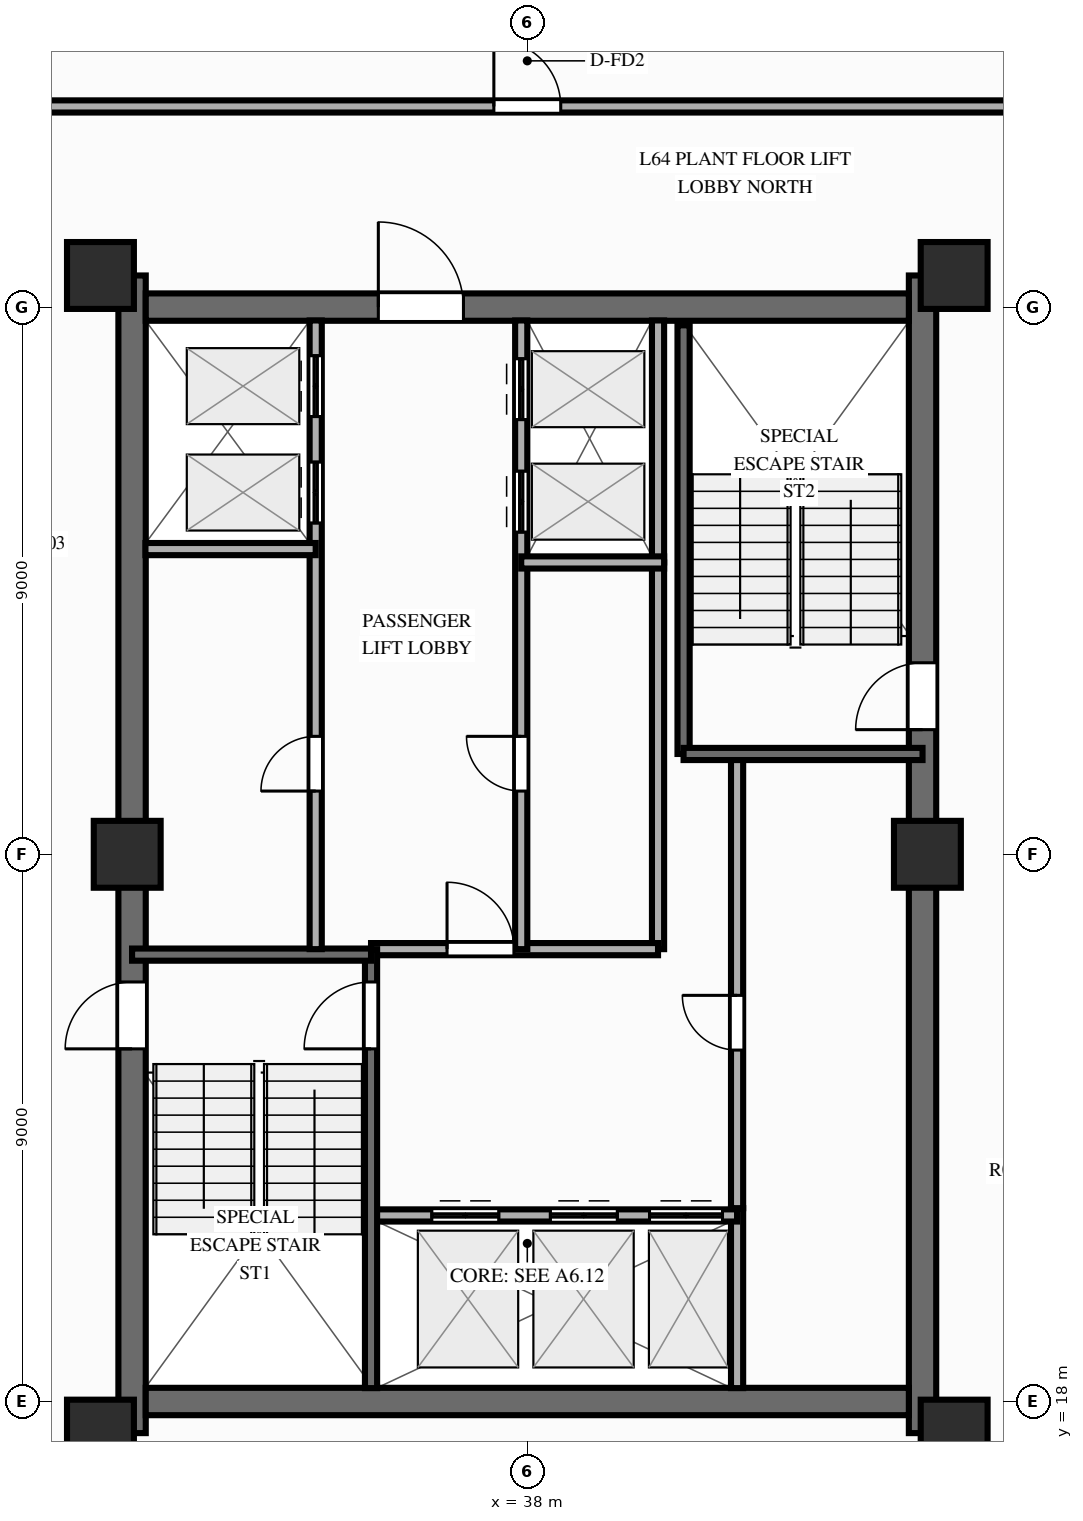
"""IFC4 building model, lengths in metres.
Left out: names, types, materials, properties, quantities, classifications, styles, units other than length and angle.
Written with IfcOpenShell. Run it as: python <this file> out.ifc"""

import sys

from ifc_helpers import new_model, si_unit, direction, frame, frame_2d, origin, origin_2d, place, context, subcontext, project, spatial, rectangle, extrude, source, transform, mapped, element, fill, save


model = new_model("IFC4")
c1 = context("Model", 3, precision=1e-05, world=origin(), true_north=direction((0.0, 1.0)))
c2 = subcontext(c1, "Body", "Model", "MODEL_VIEW")
j1 = project(units=[si_unit("LENGTHUNIT", "METRE"), si_unit("PLANEANGLEUNIT", "RADIAN")], contexts=[c1])
p1 = place(None, origin())
s1 = spatial("IfcSite", under=j1, at=p1, CompositionType="ELEMENT")
p2 = place(p1, origin())
s2 = spatial("IfcBuilding", under=s1, at=p2, CompositionType="ELEMENT")
p3 = place(p2, frame((0.0, 0.0, 206.5)))
s3 = spatial("IfcBuildingStorey", under=s2, at=p3, CompositionType="ELEMENT", Elevation=206.5)
p4 = place(p3, frame((31.5, 17.48, 0.0), z_axis=(0.0, 0.0, 1.0), x_axis=(0.0, 1.0, 0.0)))
e1 = element("IfcWall", 1, at=p4, inside=s3, PredefinedType="SHEAR", context=c2, shape_type="SweptSolid", body=[
    extrude(rectangle(XDim=19.04, YDim=0.45, at=frame_2d((9.52, 0.0))), origin(), (0.0, 0.0, 1.0), 3.8),
])
p5 = place(p4, frame((6.32, 0.0, 0.0)))
e2 = element("IfcOpeningElement", 2, at=p5, cuts=e1, PredefinedType="OPENING", context=c2, shape_type="SweptSolid", body=[
    extrude(rectangle(XDim=1.1, YDim=2.15, at=frame_2d((0.55, 1.075))), frame((0.0, 0.237, 0.0), z_axis=(0.0, -1.0, 0.0), x_axis=(1.0, 0.0, 0.0)), (0.0, 0.0, 1.0), 0.474),
])
p6 = place(p3, frame((44.5, 17.48, 0.0), z_axis=(0.0, 0.0, 1.0), x_axis=(0.0, 1.0, 0.0)))
e3 = element("IfcWall", 3, at=p6, inside=s3, PredefinedType="SHEAR", context=c2, shape_type="SweptSolid", body=[
    extrude(rectangle(XDim=19.04, YDim=0.45, at=frame_2d((9.52, 0.0))), origin(), (0.0, 0.0, 1.0), 3.8),
])
p7 = place(p6, frame((12.67, 0.0, 0.0), z_axis=(0.0, 0.0, 1.0), x_axis=(-1.0, 0.0, 0.0)))
e4 = element("IfcOpeningElement", 4, at=p7, cuts=e3, PredefinedType="OPENING", context=c2, shape_type="SweptSolid", body=[
    extrude(rectangle(XDim=1.1, YDim=2.15, at=frame_2d((0.55, 1.075))), frame((0.0, 0.237, 0.0), z_axis=(0.0, -1.0, 0.0), x_axis=(1.0, 0.0, 0.0)), (0.0, 0.0, 1.0), 0.474),
])
p8 = place(p3, frame((31.725, 18.0, 0.0), z_axis=(0.0, 0.0, 1.0), x_axis=(1.0, 0.0, 0.0)))
e5 = element("IfcWall", 5, at=p8, inside=s3, PredefinedType="SHEAR", context=c2, shape_type="SweptSolid", body=[
    extrude(rectangle(XDim=12.55, YDim=0.45, at=frame_2d((6.275, 0.0))), origin(), (0.0, 0.0, 1.0), 3.8),
])
p9 = place(p3, frame((31.725, 36.0, 0.0), z_axis=(0.0, 0.0, 1.0), x_axis=(1.0, 0.0, 0.0)))
e6 = element("IfcWall", 6, at=p9, inside=s3, PredefinedType="SHEAR", context=c2, shape_type="SweptSolid", body=[
    extrude(rectangle(XDim=12.55, YDim=0.45, at=frame_2d((6.275, 0.0))), origin(), (0.0, 0.0, 1.0), 3.8),
])
p10 = place(p9, frame((5.225, 0.0, 0.0), z_axis=(0.0, 0.0, 1.0), x_axis=(-1.0, 0.0, 0.0)))
e7 = element("IfcOpeningElement", 7, at=p10, cuts=e6, PredefinedType="OPENING", context=c2, shape_type="SweptSolid", body=[
    extrude(rectangle(XDim=1.4, YDim=2.15, at=frame_2d((0.7, 1.075))), frame((0.0, 0.237, 0.0), z_axis=(0.0, -1.0, 0.0), x_axis=(1.0, 0.0, 0.0)), (0.0, 0.0, 1.0), 0.474),
])
m1 = source(origin(), c2, "Body", "SweptSolid", [
    extrude(rectangle(XDim=1.1, YDim=1.1, at=origin_2d()), origin(), (0.0, 0.0, 1.0), 3.8),
])
for number, where, z_axis, x_axis in (
    (8, (30.98, 17.48, 0.0), (0.0, 0.0, 1.0), (1.0, 0.0, 0.0)),
    (9, (45.02, 17.48, 0.0), (0.0, 0.0, 1.0), (1.0, 0.0, 0.0)),
    (10, (30.98, 36.52, 0.0), (0.0, 0.0, 1.0), (1.0, 0.0, 0.0)),
    (11, (45.02, 36.52, 0.0), (0.0, 0.0, 1.0), (1.0, 0.0, 0.0)),
    (12, (31.42, 27.0, 0.0), (0.0, 0.0, 1.0), (1.0, 0.0, 0.0)),
    (13, (44.58, 27.0, 0.0), (0.0, 0.0, 1.0), (1.0, 0.0, 0.0)),
):
    element("IfcColumn", number, at=place(p3, frame(where, z_axis=z_axis, x_axis=x_axis)), inside=s3, PredefinedType="COLUMN", context=c2, shape_type="MappedRepresentation", body=[
        mapped(m1, transform((0.0, 0.0, 0.0), scale=1.0)),
    ])
p11 = place(p3, frame((41.45, 18.22, 0.0), z_axis=(0.0, 0.0, 1.0), x_axis=(0.0, 1.0, 0.0)))
e14 = element("IfcWall", 14, at=p11, inside=s3, PredefinedType="PARTITIONING", context=c2, shape_type="SweptSolid", body=[
    extrude(rectangle(XDim=2.96, YDim=0.2, at=frame_2d((1.48, 0.0))), origin(), (0.0, 0.0, 1.0), 3.59),
])
p12 = place(p3, frame((41.45, 21.18, 0.0), z_axis=(0.0, 0.0, 1.0), x_axis=(0.0, 1.0, 0.0)))
e15 = element("IfcWall", 15, at=p12, inside=s3, PredefinedType="PARTITIONING", context=c2, shape_type="SweptSolid", body=[
    extrude(rectangle(XDim=7.42, YDim=0.2, at=frame_2d((3.71, 0.0))), origin(), (0.0, 0.0, 1.0), 3.59),
])
p13 = place(p12, frame((2.6, 0.0, 0.0)))
e16 = element("IfcOpeningElement", 16, at=p13, cuts=e15, PredefinedType="OPENING", context=c2, shape_type="SweptSolid", body=[
    extrude(rectangle(XDim=0.9, YDim=2.1, at=frame_2d((0.45, 1.05))), frame((0.0, 0.112, 0.0), z_axis=(0.0, -1.0, 0.0), x_axis=(1.0, 0.0, 0.0)), (0.0, 0.0, 1.0), 0.224),
])
p14 = place(p3, frame((40.15, 25.44, 0.0), z_axis=(0.0, 0.0, 1.0), x_axis=(0.0, 1.0, 0.0)))
e17 = element("IfcWall", 17, at=p14, inside=s3, PredefinedType="PARTITIONING", context=c2, shape_type="SweptSolid", body=[
    extrude(rectangle(XDim=6.36, YDim=0.2, at=frame_2d((3.18, 0.0))), origin(), (0.0, 0.0, 1.0), 3.59),
])
p15 = place(p3, frame((40.15, 31.8, 0.0), z_axis=(0.0, 0.0, 1.0), x_axis=(0.0, 1.0, 0.0)))
e18 = element("IfcWall", 18, at=p15, inside=s3, PredefinedType="PARTITIONING", context=c2, shape_type="SweptSolid", body=[
    extrude(rectangle(XDim=3.98, YDim=0.2, at=frame_2d((1.99, 0.0))), origin(), (0.0, 0.0, 1.0), 3.59),
])
p16 = place(p3, frame((35.43, 21.06, 0.0), z_axis=(0.0, 0.0, 1.0), x_axis=(1.0, 0.0, 0.0)))
e19 = element("IfcWall", 19, at=p16, inside=s3, PredefinedType="PARTITIONING", context=c2, shape_type="SweptSolid", body=[
    extrude(rectangle(XDim=6.02, YDim=0.2, at=frame_2d((3.01, 0.0))), origin(), (0.0, 0.0, 1.0), 3.59),
])
p17 = place(p16, frame((1.0, 0.0, 0.0)))
e20 = element("IfcOpeningElement", 20, at=p17, cuts=e19, PredefinedType="OPENING", context=c2, shape_type="SweptSolid", body=[
    extrude(rectangle(XDim=1.1, YDim=2.15, at=frame_2d((0.55, 1.075))), frame((0.0, 0.112, 0.0), z_axis=(0.0, -1.0, 0.0), x_axis=(1.0, 0.0, 0.0)), (0.0, 0.0, 1.0), 0.224),
])
p18 = place(p16, frame((2.95, 0.0, 0.0)))
e21 = element("IfcOpeningElement", 21, at=p18, cuts=e19, PredefinedType="OPENING", context=c2, shape_type="SweptSolid", body=[
    extrude(rectangle(XDim=1.1, YDim=2.15, at=frame_2d((0.55, 1.075))), frame((0.0, 0.112, 0.0), z_axis=(0.0, -1.0, 0.0), x_axis=(1.0, 0.0, 0.0)), (0.0, 0.0, 1.0), 0.224),
])
p19 = place(p16, frame((4.58, 0.0, 0.0)))
e22 = element("IfcOpeningElement", 22, at=p19, cuts=e19, PredefinedType="OPENING", context=c2, shape_type="SweptSolid", body=[
    extrude(rectangle(XDim=1.2, YDim=2.15, at=frame_2d((0.6, 1.075))), frame((0.0, 0.112, 0.0), z_axis=(0.0, -1.0, 0.0), x_axis=(1.0, 0.0, 0.0)), (0.0, 0.0, 1.0), 0.224),
])
p20 = place(p3, frame((35.43, 25.44, 0.0), z_axis=(0.0, 0.0, 1.0), x_axis=(1.0, 0.0, 0.0)))
e23 = element("IfcWall", 23, at=p20, inside=s3, PredefinedType="PARTITIONING", context=c2, shape_type="SweptSolid", body=[
    extrude(rectangle(XDim=4.72, YDim=0.2, at=frame_2d((2.36, 0.0))), origin(), (0.0, 0.0, 1.0), 3.59),
])
p21 = place(p20, frame((1.25, 0.0, 0.0)))
e24 = element("IfcOpeningElement", 24, at=p21, cuts=e23, PredefinedType="OPENING", context=c2, shape_type="SweptSolid", body=[
    extrude(rectangle(XDim=1.1, YDim=2.15, at=frame_2d((0.55, 1.075))), frame((0.0, 0.112, 0.0), z_axis=(0.0, -1.0, 0.0), x_axis=(1.0, 0.0, 0.0)), (0.0, 0.0, 1.0), 0.224),
])
p22 = place(p3, frame((35.43, 18.22, 0.0), z_axis=(0.0, 0.0, 1.0), x_axis=(0.0, 1.0, 0.0)))
e25 = element("IfcWall", 25, at=p22, inside=s3, PredefinedType="SOLIDWALL", context=c2, shape_type="SweptSolid", body=[
    extrude(rectangle(XDim=7.22, YDim=0.2, at=frame_2d((3.61, 0.0))), origin(), (0.0, 0.0, 1.0), 3.59),
])
p23 = place(p22, frame((6.68, 0.0, 0.0), z_axis=(0.0, 0.0, 1.0), x_axis=(-1.0, 0.0, 0.0)))
e26 = element("IfcOpeningElement", 26, at=p23, cuts=e25, PredefinedType="OPENING", context=c2, shape_type="SweptSolid", body=[
    extrude(rectangle(XDim=1.1, YDim=2.15, at=frame_2d((0.55, 1.075))), frame((0.0, 0.112, 0.0), z_axis=(0.0, -1.0, 0.0), x_axis=(1.0, 0.0, 0.0)), (0.0, 0.0, 1.0), 0.224),
])
p24 = place(p3, frame((31.5, 25.35, 0.0), z_axis=(0.0, 0.0, 1.0), x_axis=(1.0, 0.0, 0.0)))
e27 = element("IfcWall", 27, at=p24, inside=s3, PredefinedType="SOLIDWALL", context=c2, shape_type="SweptSolid", body=[
    extrude(rectangle(XDim=3.93, YDim=0.2, at=frame_2d((1.965, 0.0))), origin(), (0.0, 0.0, 1.0), 3.59),
])
p25 = place(p3, frame((40.57, 28.65, 0.0), z_axis=(0.0, 0.0, 1.0), x_axis=(0.0, 1.0, 0.0)))
e28 = element("IfcWall", 28, at=p25, inside=s3, PredefinedType="SOLIDWALL", context=c2, shape_type="SweptSolid", body=[
    extrude(rectangle(XDim=7.05, YDim=0.2, at=frame_2d((3.525, 0.0))), origin(), (0.0, 0.0, 1.0), 3.59),
])
p26 = place(p3, frame((40.57, 28.65, 0.0), z_axis=(0.0, 0.0, 1.0), x_axis=(1.0, 0.0, 0.0)))
e29 = element("IfcWall", 29, at=p26, inside=s3, PredefinedType="SOLIDWALL", context=c2, shape_type="SweptSolid", body=[
    extrude(rectangle(XDim=3.93, YDim=0.2, at=frame_2d((1.965, 0.0))), origin(), (0.0, 0.0, 1.0), 3.59),
])
p27 = place(p3, frame((34.52, 25.44, 0.0), z_axis=(0.0, 0.0, 1.0), x_axis=(0.0, 1.0, 0.0)))
e30 = element("IfcWall", 30, at=p27, inside=s3, PredefinedType="PARTITIONING", context=c2, shape_type="SweptSolid", body=[
    extrude(rectangle(XDim=10.34, YDim=0.2, at=frame_2d((5.17, 0.0))), origin(), (0.0, 0.0, 1.0), 3.59),
])
p28 = place(p27, frame((2.6, 0.0, 0.0)))
e31 = element("IfcOpeningElement", 31, at=p28, cuts=e30, PredefinedType="OPENING", context=c2, shape_type="SweptSolid", body=[
    extrude(rectangle(XDim=0.9, YDim=2.1, at=frame_2d((0.45, 1.05))), frame((0.0, 0.112, 0.0), z_axis=(0.0, -1.0, 0.0), x_axis=(1.0, 0.0, 0.0)), (0.0, 0.0, 1.0), 0.224),
])
p29 = place(p27, frame((7.01, 0.0, 0.0)))
e32 = element("IfcOpeningElement", 32, at=p29, cuts=e30, PredefinedType="OPENING", context=c2, shape_type="SweptSolid", body=[
    extrude(rectangle(XDim=1.0, YDim=2.15, at=frame_2d((0.5, 1.075))), frame((0.0, 0.112, 0.0), z_axis=(0.0, -1.0, 0.0), x_axis=(1.0, 0.0, 0.0)), (0.0, 0.0, 1.0), 0.224),
])
p30 = place(p27, frame((8.76, 0.0, 0.0)))
e33 = element("IfcOpeningElement", 33, at=p30, cuts=e30, PredefinedType="OPENING", context=c2, shape_type="SweptSolid", body=[
    extrude(rectangle(XDim=1.0, YDim=2.15, at=frame_2d((0.5, 1.075))), frame((0.0, 0.112, 0.0), z_axis=(0.0, -1.0, 0.0), x_axis=(1.0, 0.0, 0.0)), (0.0, 0.0, 1.0), 0.224),
])
p31 = place(p3, frame((31.72, 32.02, 0.0), z_axis=(0.0, 0.0, 1.0), x_axis=(1.0, 0.0, 0.0)))
e34 = element("IfcWall", 34, at=p31, inside=s3, PredefinedType="PARTITIONING", context=c2, shape_type="SweptSolid", body=[
    extrude(rectangle(XDim=2.8, YDim=0.2, at=frame_2d((1.4, 0.0))), origin(), (0.0, 0.0, 1.0), 3.59),
])
p32 = place(p3, frame((37.9, 25.44, 0.0), z_axis=(0.0, 0.0, 1.0), x_axis=(0.0, 1.0, 0.0)))
e35 = element("IfcWall", 35, at=p32, inside=s3, PredefinedType="PARTITIONING", context=c2, shape_type="SweptSolid", body=[
    extrude(rectangle(XDim=10.34, YDim=0.2, at=frame_2d((5.17, 0.0))), origin(), (0.0, 0.0, 1.0), 3.59),
])
p33 = place(p32, frame((2.6, 0.0, 0.0)))
e36 = element("IfcOpeningElement", 36, at=p33, cuts=e35, PredefinedType="OPENING", context=c2, shape_type="SweptSolid", body=[
    extrude(rectangle(XDim=0.9, YDim=2.1, at=frame_2d((0.45, 1.05))), frame((0.0, 0.112, 0.0), z_axis=(0.0, -1.0, 0.0), x_axis=(1.0, 0.0, 0.0)), (0.0, 0.0, 1.0), 0.224),
])
p34 = place(p32, frame((6.86, 0.0, 0.0)))
e37 = element("IfcOpeningElement", 37, at=p34, cuts=e35, PredefinedType="OPENING", context=c2, shape_type="SweptSolid", body=[
    extrude(rectangle(XDim=1.0, YDim=2.15, at=frame_2d((0.5, 1.075))), frame((0.0, 0.112, 0.0), z_axis=(0.0, -1.0, 0.0), x_axis=(1.0, 0.0, 0.0)), (0.0, 0.0, 1.0), 0.224),
])
p35 = place(p32, frame((8.71, 0.0, 0.0)))
e38 = element("IfcOpeningElement", 38, at=p35, cuts=e35, PredefinedType="OPENING", context=c2, shape_type="SweptSolid", body=[
    extrude(rectangle(XDim=1.0, YDim=2.15, at=frame_2d((0.5, 1.075))), frame((0.0, 0.112, 0.0), z_axis=(0.0, -1.0, 0.0), x_axis=(1.0, 0.0, 0.0)), (0.0, 0.0, 1.0), 0.224),
])
p36 = place(p3, frame((37.9, 31.8, 0.0), z_axis=(0.0, 0.0, 1.0), x_axis=(1.0, 0.0, 0.0)))
e39 = element("IfcWall", 39, at=p36, inside=s3, PredefinedType="PARTITIONING", context=c2, shape_type="SweptSolid", body=[
    extrude(rectangle(XDim=2.35, YDim=0.2, at=frame_2d((1.175, 0.0))), origin(), (0.0, 0.0, 1.0), 3.59),
])
p37 = place(p3, frame((28.9, 39.3, 0.0), z_axis=(0.0, 0.0, 1.0), x_axis=(1.0, 0.0, 0.0)))
e40 = element("IfcWall", 40, at=p37, inside=s3, PredefinedType="PARTITIONING", context=c2, shape_type="SweptSolid", body=[
    extrude(rectangle(XDim=18.2, YDim=0.2, at=frame_2d((9.1, 0.0))), origin(), (0.0, 0.0, 1.0), 3.59),
])
p38 = place(p37, frame((8.55, 0.0, 0.0)))
e41 = element("IfcOpeningElement", 41, at=p38, cuts=e40, PredefinedType="OPENING", context=c2, shape_type="SweptSolid", body=[
    extrude(rectangle(XDim=1.1, YDim=2.15, at=frame_2d((0.55, 1.075))), frame((0.0, 0.112, 0.0), z_axis=(0.0, -1.0, 0.0), x_axis=(1.0, 0.0, 0.0)), (0.0, 0.0, 1.0), 0.224),
])
m2 = source(origin(), c2, "Body", "SweptSolid", [
    extrude(rectangle(XDim=1.1, YDim=2.15, at=frame_2d((0.55, 1.075))), frame((0.0, 0.025, 0.0), z_axis=(0.0, -1.0, 0.0), x_axis=(1.0, 0.0, 0.0)), (0.0, 0.0, 1.0), 0.05),
])
p39 = place(p5, origin())
e42 = element("IfcDoor", 42, at=p39, inside=s3, OperationType="SINGLE_SWING_LEFT", PredefinedType="DOOR", context=c2, shape_type="MappedRepresentation", body=[
    mapped(m2, transform((0.0, 0.0, 0.0), scale=1.0)),
])
fill(e2, e42)
p40 = place(p7, origin())
e43 = element("IfcDoor", 43, at=p40, inside=s3, OperationType="SINGLE_SWING_RIGHT", PredefinedType="DOOR", context=c2, shape_type="MappedRepresentation", body=[
    mapped(m2, transform((0.0, 0.0, 0.0), scale=1.0)),
])
fill(e4, e43)
m3 = source(origin(), c2, "Body", "SweptSolid", [
    extrude(rectangle(XDim=1.4, YDim=2.15, at=frame_2d((0.7, 1.075))), frame((0.0, 0.025, 0.0), z_axis=(0.0, -1.0, 0.0), x_axis=(1.0, 0.0, 0.0)), (0.0, 0.0, 1.0), 0.05),
])
p41 = place(p10, origin())
e44 = element("IfcDoor", 44, at=p41, inside=s3, OperationType="SINGLE_SWING_RIGHT", PredefinedType="DOOR", context=c2, shape_type="MappedRepresentation", body=[
    mapped(m3, transform((0.0, 0.0, 0.0), scale=1.0)),
])
fill(e7, e44)
m4 = source(origin(), c2, "Body", "SweptSolid", [
    extrude(rectangle(XDim=0.9, YDim=2.1, at=frame_2d((0.45, 1.05))), frame((0.0, 0.025, 0.0), z_axis=(0.0, -1.0, 0.0), x_axis=(1.0, 0.0, 0.0)), (0.0, 0.0, 1.0), 0.05),
])
p42 = place(p13, origin())
e45 = element("IfcDoor", 45, at=p42, inside=s3, OperationType="SINGLE_SWING_RIGHT", PredefinedType="DOOR", context=c2, shape_type="MappedRepresentation", body=[
    mapped(m4, transform((0.0, 0.0, 0.0), scale=1.0)),
])
fill(e16, e45)
p43 = place(p17, origin())
e46 = element("IfcDoor", 46, at=p43, inside=s3, OperationType="DOUBLE_DOOR_SLIDING", PredefinedType="DOOR", context=c2, shape_type="MappedRepresentation", body=[
    mapped(m2, transform((0.0, 0.0, 0.0), scale=1.0)),
])
fill(e20, e46)
p44 = place(p18, origin())
e47 = element("IfcDoor", 47, at=p44, inside=s3, OperationType="DOUBLE_DOOR_SLIDING", PredefinedType="DOOR", context=c2, shape_type="MappedRepresentation", body=[
    mapped(m2, transform((0.0, 0.0, 0.0), scale=1.0)),
])
fill(e21, e47)
m5 = source(origin(), c2, "Body", "SweptSolid", [
    extrude(rectangle(XDim=1.2, YDim=2.15, at=frame_2d((0.6, 1.075))), frame((0.0, 0.025, 0.0), z_axis=(0.0, -1.0, 0.0), x_axis=(1.0, 0.0, 0.0)), (0.0, 0.0, 1.0), 0.05),
])
p45 = place(p19, origin())
e48 = element("IfcDoor", 48, at=p45, inside=s3, OperationType="DOUBLE_DOOR_SLIDING", PredefinedType="DOOR", context=c2, shape_type="MappedRepresentation", body=[
    mapped(m5, transform((0.0, 0.0, 0.0), scale=1.0)),
])
fill(e22, e48)
p46 = place(p21, origin())
e49 = element("IfcDoor", 49, at=p46, inside=s3, OperationType="SINGLE_SWING_LEFT", PredefinedType="DOOR", context=c2, shape_type="MappedRepresentation", body=[
    mapped(m2, transform((0.0, 0.0, 0.0), scale=1.0)),
])
fill(e24, e49)
p47 = place(p23, origin())
e50 = element("IfcDoor", 50, at=p47, inside=s3, OperationType="SINGLE_SWING_RIGHT", PredefinedType="DOOR", context=c2, shape_type="MappedRepresentation", body=[
    mapped(m2, transform((0.0, 0.0, 0.0), scale=1.0)),
])
fill(e26, e50)
p48 = place(p28, origin())
e51 = element("IfcDoor", 51, at=p48, inside=s3, OperationType="SINGLE_SWING_LEFT", PredefinedType="DOOR", context=c2, shape_type="MappedRepresentation", body=[
    mapped(m4, transform((0.0, 0.0, 0.0), scale=1.0)),
])
fill(e31, e51)
m6 = source(origin(), c2, "Body", "SweptSolid", [
    extrude(rectangle(XDim=1.0, YDim=2.15, at=frame_2d((0.5, 1.075))), frame((0.0, 0.025, 0.0), z_axis=(0.0, -1.0, 0.0), x_axis=(1.0, 0.0, 0.0)), (0.0, 0.0, 1.0), 0.05),
])
p49 = place(p29, origin())
e52 = element("IfcDoor", 52, at=p49, inside=s3, OperationType="DOUBLE_DOOR_SLIDING", PredefinedType="DOOR", context=c2, shape_type="MappedRepresentation", body=[
    mapped(m6, transform((0.0, 0.0, 0.0), scale=1.0)),
])
fill(e32, e52)
p50 = place(p30, origin())
e53 = element("IfcDoor", 53, at=p50, inside=s3, OperationType="DOUBLE_DOOR_SLIDING", PredefinedType="DOOR", context=c2, shape_type="MappedRepresentation", body=[
    mapped(m6, transform((0.0, 0.0, 0.0), scale=1.0)),
])
fill(e33, e53)
p51 = place(p33, origin())
e54 = element("IfcDoor", 54, at=p51, inside=s3, OperationType="SINGLE_SWING_RIGHT", PredefinedType="DOOR", context=c2, shape_type="MappedRepresentation", body=[
    mapped(m4, transform((0.0, 0.0, 0.0), scale=1.0)),
])
fill(e36, e54)
p52 = place(p34, origin())
e55 = element("IfcDoor", 55, at=p52, inside=s3, OperationType="DOUBLE_DOOR_SLIDING", PredefinedType="DOOR", context=c2, shape_type="MappedRepresentation", body=[
    mapped(m6, transform((0.0, 0.0, 0.0), scale=1.0)),
])
fill(e37, e55)
p53 = place(p35, origin())
e56 = element("IfcDoor", 56, at=p53, inside=s3, OperationType="DOUBLE_DOOR_SLIDING", PredefinedType="DOOR", context=c2, shape_type="MappedRepresentation", body=[
    mapped(m6, transform((0.0, 0.0, 0.0), scale=1.0)),
])
fill(e38, e56)
p54 = place(p38, origin())
e57 = element("IfcDoor", 57, at=p54, inside=s3, OperationType="SINGLE_SWING_LEFT", PredefinedType="DOOR", context=c2, shape_type="MappedRepresentation", body=[
    mapped(m2, transform((0.0, 0.0, 0.0), scale=1.0)),
])
fill(e41, e57)
save(model, sys.argv[1])
